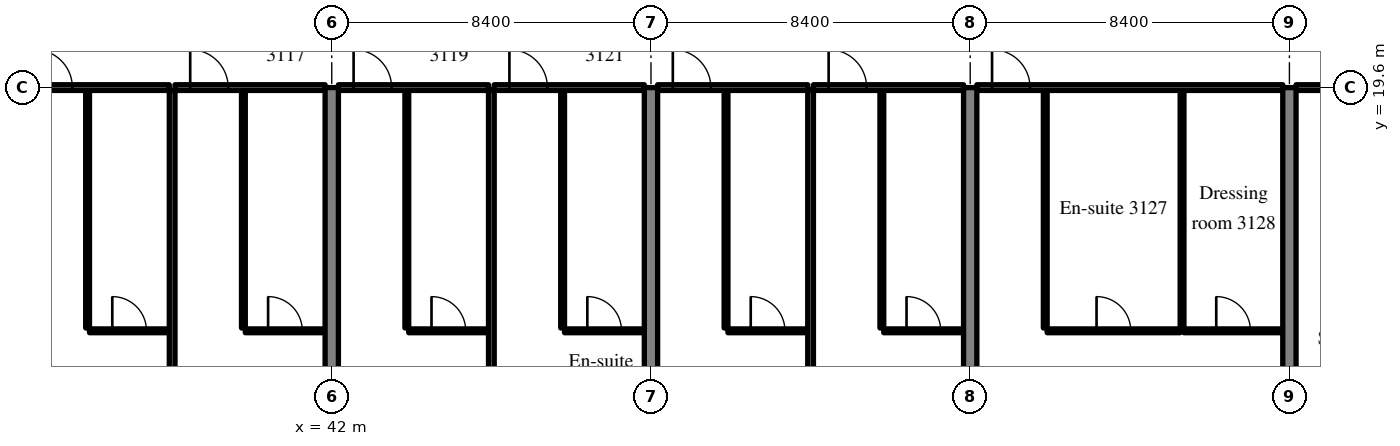
"""IFC4 building model, lengths in metres.
Left out: names, types, materials, properties, quantities, classifications, styles, units other than length and angle.
Written with IfcOpenShell. Run it as: python <this file> out.ifc"""

import sys

from ifc_helpers import new_model, si_unit, direction, frame, frame_2d, origin, place, context, subcontext, project, spatial, rectangle, extrude, source, transform, mapped, element, fill, save


model = new_model("IFC4")
c1 = context("Model", 3, precision=1e-05, world=origin(), true_north=direction((0.0, 1.0)))
c2 = subcontext(c1, "Body", "Model", "MODEL_VIEW")
j1 = project(units=[si_unit("LENGTHUNIT", "METRE"), si_unit("PLANEANGLEUNIT", "RADIAN")], contexts=[c1])
p1 = place(None, origin())
s1 = spatial("IfcSite", under=j1, at=p1, CompositionType="ELEMENT")
p2 = place(p1, origin())
s2 = spatial("IfcBuilding", under=s1, at=p2, CompositionType="ELEMENT")
p3 = place(p2, frame((0.0, 0.0, 129.4)))
s3 = spatial("IfcBuildingStorey", under=s2, at=p3, CompositionType="ELEMENT", Elevation=129.4)
m1 = source(origin(), c2, "Body", "SweptSolid", [
    extrude(rectangle(XDim=14.1, YDim=0.35, at=frame_2d((7.05, 0.0))), origin(), (0.0, 0.0, 1.0), 3.52),
])
p4 = place(p3, frame((42.0, 5.5, 0.0), z_axis=(0.0, 0.0, 1.0), x_axis=(0.0, 1.0, 0.0)))
e1 = element("IfcWall", 1, at=p4, inside=s3, PredefinedType="SHEAR", context=c2, shape_type="MappedRepresentation", body=[
    mapped(m1, transform((0.0, 0.0, 0.0), scale=1.0)),
])
m2 = source(origin(), c2, "Body", "SweptSolid", [
    extrude(rectangle(XDim=13.1, YDim=0.35, at=frame_2d((6.55, 0.0))), origin(), (0.0, 0.0, 1.0), 3.52),
])
p5 = place(p3, frame((50.4, 6.5, 0.0), z_axis=(0.0, 0.0, 1.0), x_axis=(0.0, 1.0, 0.0)))
e2 = element("IfcWall", 2, at=p5, inside=s3, PredefinedType="SHEAR", context=c2, shape_type="MappedRepresentation", body=[
    mapped(m2, transform((0.0, 0.0, 0.0), scale=1.0)),
])
for number, where, z_axis, x_axis in (
    (3, (58.8, 5.5, 0.0), (0.0, 0.0, 1.0), (0.0, 1.0, 0.0)),
    (4, (67.2, 5.5, 0.0), (0.0, 0.0, 1.0), (0.0, 1.0, 0.0)),
):
    element("IfcWall", number, at=place(p3, frame(where, z_axis=z_axis, x_axis=x_axis)), inside=s3, PredefinedType="SHEAR", context=c2, shape_type="MappedRepresentation", body=[
        mapped(m1, transform((0.0, 0.0, 0.0), scale=1.0)),
    ])
m3 = source(origin(), c2, "Body", "SweptSolid", [
    extrude(rectangle(XDim=6.25, YDim=0.1, at=frame_2d((3.125, 0.0))), origin(), (0.0, 0.0, 1.0), 3.52),
])
p6 = place(p3, frame((35.575, 13.275, 0.0), z_axis=(0.0, 0.0, 1.0), x_axis=(0.0, 1.0, 0.0)))
e5 = element("IfcWall", 5, at=p6, inside=s3, PredefinedType="PARTITIONING", context=c2, shape_type="MappedRepresentation", body=[
    mapped(m3, transform((0.0, 0.0, 0.0), scale=1.0)),
])
m4 = source(origin(), c2, "Body", "SweptSolid", [
    extrude(rectangle(XDim=2.1, YDim=0.1, at=frame_2d((1.05, 0.0))), origin(), (0.0, 0.0, 1.0), 3.52),
])
p7 = place(p3, frame((35.625, 13.2, 0.0), z_axis=(0.0, 0.0, 1.0), x_axis=(1.0, 0.0, 0.0)))
e6 = element("IfcWall", 6, at=p7, inside=s3, PredefinedType="PARTITIONING", context=c2, shape_type="MappedRepresentation", body=[
    mapped(m4, transform((0.0, 0.0, 0.0), scale=1.0)),
])
m5 = source(origin(), c2, "Body", "SweptSolid", [
    extrude(rectangle(XDim=0.9, YDim=2.1, at=frame_2d((0.45, 1.05))), frame((0.0, 0.06, 0.0), z_axis=(0.0, -1.0, 0.0), x_axis=(1.0, 0.0, 0.0)), (0.0, 0.0, 1.0), 0.12),
])
p8 = place(p7, frame((0.6, 0.0, 0.0)))
e7 = element("IfcOpeningElement", 7, at=p8, cuts=e6, PredefinedType="OPENING", context=c2, shape_type="MappedRepresentation", body=[
    mapped(m5, transform((0.0, 0.0, 0.0), scale=1.0)),
])
m6 = source(origin(), c2, "Body", "SweptSolid", [
    extrude(rectangle(XDim=3.95, YDim=0.15, at=frame_2d((1.975, 0.0))), origin(), (0.0, 0.0, 1.0), 2.82),
])
p9 = place(p3, frame((33.775, 19.6, 0.0), z_axis=(0.0, 0.0, 1.0), x_axis=(1.0, 0.0, 0.0)))
e8 = element("IfcWall", 8, at=p9, inside=s3, PredefinedType="PARTITIONING", context=c2, shape_type="MappedRepresentation", body=[
    mapped(m6, transform((0.0, 0.0, 0.0), scale=1.0)),
])
m7 = source(origin(), c2, "Body", "SweptSolid", [
    extrude(rectangle(XDim=1.0, YDim=2.1, at=frame_2d((0.5, 1.05))), frame((0.0, 0.085, 0.0), z_axis=(0.0, -1.0, 0.0), x_axis=(1.0, 0.0, 0.0)), (0.0, 0.0, 1.0), 0.17),
])
p10 = place(p9, frame((0.4, 0.0, 0.0)))
e9 = element("IfcOpeningElement", 9, at=p10, cuts=e8, PredefinedType="OPENING", context=c2, shape_type="MappedRepresentation", body=[
    mapped(m7, transform((0.0, 0.0, 0.0), scale=1.0)),
])
p11 = place(p3, frame((39.675, 13.275, 0.0), z_axis=(0.0, 0.0, 1.0), x_axis=(0.0, 1.0, 0.0)))
e10 = element("IfcWall", 10, at=p11, inside=s3, PredefinedType="PARTITIONING", context=c2, shape_type="MappedRepresentation", body=[
    mapped(m3, transform((0.0, 0.0, 0.0), scale=1.0)),
])
m8 = source(origin(), c2, "Body", "SweptSolid", [
    extrude(rectangle(XDim=2.1, YDim=0.1, at=frame_2d((1.05, 0.0))), origin(), (0.0, 0.0, 1.0), 3.52),
])
p12 = place(p3, frame((39.725, 13.2, 0.0), z_axis=(0.0, 0.0, 1.0), x_axis=(1.0, 0.0, 0.0)))
e11 = element("IfcWall", 11, at=p12, inside=s3, PredefinedType="PARTITIONING", context=c2, shape_type="MappedRepresentation", body=[
    mapped(m8, transform((0.0, 0.0, 0.0), scale=1.0)),
])
p13 = place(p12, frame((0.6, 0.0, 0.0)))
e12 = element("IfcOpeningElement", 12, at=p13, cuts=e11, PredefinedType="OPENING", context=c2, shape_type="MappedRepresentation", body=[
    mapped(m5, transform((0.0, 0.0, 0.0), scale=1.0)),
])
m9 = source(origin(), c2, "Body", "SweptSolid", [
    extrude(rectangle(XDim=3.95, YDim=0.15, at=frame_2d((1.975, 0.0))), origin(), (0.0, 0.0, 1.0), 2.82),
])
p14 = place(p3, frame((37.875, 19.6, 0.0), z_axis=(0.0, 0.0, 1.0), x_axis=(1.0, 0.0, 0.0)))
e13 = element("IfcWall", 13, at=p14, inside=s3, PredefinedType="PARTITIONING", context=c2, shape_type="MappedRepresentation", body=[
    mapped(m9, transform((0.0, 0.0, 0.0), scale=1.0)),
])
p15 = place(p14, frame((0.4, 0.0, 0.0)))
e14 = element("IfcOpeningElement", 14, at=p15, cuts=e13, PredefinedType="OPENING", context=c2, shape_type="MappedRepresentation", body=[
    mapped(m7, transform((0.0, 0.0, 0.0), scale=1.0)),
])
m10 = source(origin(), c2, "Body", "SweptSolid", [
    extrude(rectangle(XDim=15.498, YDim=0.15, at=frame_2d((7.749, 0.0))), origin(), (0.0, 0.0, 1.0), 3.52),
])
p16 = place(p3, frame((37.8, 4.027, 0.0), z_axis=(0.0, 0.0, 1.0), x_axis=(0.0, 1.0, 0.0)))
e15 = element("IfcWall", 15, at=p16, inside=s3, PredefinedType="PARTITIONING", context=c2, shape_type="MappedRepresentation", body=[
    mapped(m10, transform((0.0, 0.0, 0.0), scale=1.0)),
])
p17 = place(p3, frame((43.975, 13.275, 0.0), z_axis=(0.0, 0.0, 1.0), x_axis=(0.0, 1.0, 0.0)))
e16 = element("IfcWall", 16, at=p17, inside=s3, PredefinedType="PARTITIONING", context=c2, shape_type="MappedRepresentation", body=[
    mapped(m3, transform((0.0, 0.0, 0.0), scale=1.0)),
])
p18 = place(p3, frame((44.025, 13.2, 0.0), z_axis=(0.0, 0.0, 1.0), x_axis=(1.0, 0.0, 0.0)))
e17 = element("IfcWall", 17, at=p18, inside=s3, PredefinedType="PARTITIONING", context=c2, shape_type="MappedRepresentation", body=[
    mapped(m4, transform((0.0, 0.0, 0.0), scale=1.0)),
])
p19 = place(p18, frame((0.6, 0.0, 0.0)))
e18 = element("IfcOpeningElement", 18, at=p19, cuts=e17, PredefinedType="OPENING", context=c2, shape_type="MappedRepresentation", body=[
    mapped(m5, transform((0.0, 0.0, 0.0), scale=1.0)),
])
p20 = place(p3, frame((42.175, 19.6, 0.0), z_axis=(0.0, 0.0, 1.0), x_axis=(1.0, 0.0, 0.0)))
e19 = element("IfcWall", 19, at=p20, inside=s3, PredefinedType="PARTITIONING", context=c2, shape_type="MappedRepresentation", body=[
    mapped(m9, transform((0.0, 0.0, 0.0), scale=1.0)),
])
p21 = place(p20, frame((0.4, 0.0, 0.0)))
e20 = element("IfcOpeningElement", 20, at=p21, cuts=e19, PredefinedType="OPENING", context=c2, shape_type="MappedRepresentation", body=[
    mapped(m7, transform((0.0, 0.0, 0.0), scale=1.0)),
])
p22 = place(p3, frame((48.075, 13.275, 0.0), z_axis=(0.0, 0.0, 1.0), x_axis=(0.0, 1.0, 0.0)))
e21 = element("IfcWall", 21, at=p22, inside=s3, PredefinedType="PARTITIONING", context=c2, shape_type="MappedRepresentation", body=[
    mapped(m3, transform((0.0, 0.0, 0.0), scale=1.0)),
])
p23 = place(p3, frame((48.125, 13.2, 0.0), z_axis=(0.0, 0.0, 1.0), x_axis=(1.0, 0.0, 0.0)))
e22 = element("IfcWall", 22, at=p23, inside=s3, PredefinedType="PARTITIONING", context=c2, shape_type="MappedRepresentation", body=[
    mapped(m4, transform((0.0, 0.0, 0.0), scale=1.0)),
])
p24 = place(p23, frame((0.6, 0.0, 0.0)))
e23 = element("IfcOpeningElement", 23, at=p24, cuts=e22, PredefinedType="OPENING", context=c2, shape_type="MappedRepresentation", body=[
    mapped(m5, transform((0.0, 0.0, 0.0), scale=1.0)),
])
p25 = place(p3, frame((46.275, 19.6, 0.0), z_axis=(0.0, 0.0, 1.0), x_axis=(1.0, 0.0, 0.0)))
e24 = element("IfcWall", 24, at=p25, inside=s3, PredefinedType="PARTITIONING", context=c2, shape_type="MappedRepresentation", body=[
    mapped(m6, transform((0.0, 0.0, 0.0), scale=1.0)),
])
p26 = place(p25, frame((0.4, 0.0, 0.0)))
e25 = element("IfcOpeningElement", 25, at=p26, cuts=e24, PredefinedType="OPENING", context=c2, shape_type="MappedRepresentation", body=[
    mapped(m7, transform((0.0, 0.0, 0.0), scale=1.0)),
])
m11 = source(origin(), c2, "Body", "SweptSolid", [
    extrude(rectangle(XDim=14.906, YDim=0.15, at=frame_2d((7.453, 0.0))), origin(), (0.0, 0.0, 1.0), 3.52),
])
p27 = place(p3, frame((46.2, 4.619, 0.0), z_axis=(0.0, 0.0, 1.0), x_axis=(0.0, 1.0, 0.0)))
e26 = element("IfcWall", 26, at=p27, inside=s3, PredefinedType="PARTITIONING", context=c2, shape_type="MappedRepresentation", body=[
    mapped(m11, transform((0.0, 0.0, 0.0), scale=1.0)),
])
p28 = place(p3, frame((52.375, 13.275, 0.0), z_axis=(0.0, 0.0, 1.0), x_axis=(0.0, 1.0, 0.0)))
e27 = element("IfcWall", 27, at=p28, inside=s3, PredefinedType="PARTITIONING", context=c2, shape_type="MappedRepresentation", body=[
    mapped(m3, transform((0.0, 0.0, 0.0), scale=1.0)),
])
p29 = place(p3, frame((52.425, 13.2, 0.0), z_axis=(0.0, 0.0, 1.0), x_axis=(1.0, 0.0, 0.0)))
e28 = element("IfcWall", 28, at=p29, inside=s3, PredefinedType="PARTITIONING", context=c2, shape_type="MappedRepresentation", body=[
    mapped(m8, transform((0.0, 0.0, 0.0), scale=1.0)),
])
p30 = place(p29, frame((0.6, 0.0, 0.0)))
e29 = element("IfcOpeningElement", 29, at=p30, cuts=e28, PredefinedType="OPENING", context=c2, shape_type="MappedRepresentation", body=[
    mapped(m5, transform((0.0, 0.0, 0.0), scale=1.0)),
])
p31 = place(p3, frame((50.575, 19.6, 0.0), z_axis=(0.0, 0.0, 1.0), x_axis=(1.0, 0.0, 0.0)))
e30 = element("IfcWall", 30, at=p31, inside=s3, PredefinedType="PARTITIONING", context=c2, shape_type="MappedRepresentation", body=[
    mapped(m9, transform((0.0, 0.0, 0.0), scale=1.0)),
])
p32 = place(p31, frame((0.4, 0.0, 0.0)))
e31 = element("IfcOpeningElement", 31, at=p32, cuts=e30, PredefinedType="OPENING", context=c2, shape_type="MappedRepresentation", body=[
    mapped(m7, transform((0.0, 0.0, 0.0), scale=1.0)),
])
p33 = place(p3, frame((56.475, 13.275, 0.0), z_axis=(0.0, 0.0, 1.0), x_axis=(0.0, 1.0, 0.0)))
e32 = element("IfcWall", 32, at=p33, inside=s3, PredefinedType="PARTITIONING", context=c2, shape_type="MappedRepresentation", body=[
    mapped(m3, transform((0.0, 0.0, 0.0), scale=1.0)),
])
p34 = place(p3, frame((56.525, 13.2, 0.0), z_axis=(0.0, 0.0, 1.0), x_axis=(1.0, 0.0, 0.0)))
e33 = element("IfcWall", 33, at=p34, inside=s3, PredefinedType="PARTITIONING", context=c2, shape_type="MappedRepresentation", body=[
    mapped(m4, transform((0.0, 0.0, 0.0), scale=1.0)),
])
p35 = place(p34, frame((0.6, 0.0, 0.0)))
e34 = element("IfcOpeningElement", 34, at=p35, cuts=e33, PredefinedType="OPENING", context=c2, shape_type="MappedRepresentation", body=[
    mapped(m5, transform((0.0, 0.0, 0.0), scale=1.0)),
])
p36 = place(p3, frame((54.675, 19.6, 0.0), z_axis=(0.0, 0.0, 1.0), x_axis=(1.0, 0.0, 0.0)))
e35 = element("IfcWall", 35, at=p36, inside=s3, PredefinedType="PARTITIONING", context=c2, shape_type="MappedRepresentation", body=[
    mapped(m9, transform((0.0, 0.0, 0.0), scale=1.0)),
])
p37 = place(p36, frame((0.4, 0.0, 0.0)))
e36 = element("IfcOpeningElement", 36, at=p37, cuts=e35, PredefinedType="OPENING", context=c2, shape_type="MappedRepresentation", body=[
    mapped(m7, transform((0.0, 0.0, 0.0), scale=1.0)),
])
p38 = place(p3, frame((54.6, 4.619, 0.0), z_axis=(0.0, 0.0, 1.0), x_axis=(0.0, 1.0, 0.0)))
e37 = element("IfcWall", 37, at=p38, inside=s3, PredefinedType="PARTITIONING", context=c2, shape_type="MappedRepresentation", body=[
    mapped(m11, transform((0.0, 0.0, 0.0), scale=1.0)),
])
for number, where, z_axis, x_axis in (
    (38, (60.775, 13.275, 0.0), (0.0, 0.0, 1.0), (0.0, 1.0, 0.0)),
    (39, (64.375, 13.275, 0.0), (0.0, 0.0, 1.0), (0.0, 1.0, 0.0)),
):
    element("IfcWall", number, at=place(p3, frame(where, z_axis=z_axis, x_axis=x_axis)), inside=s3, PredefinedType="PARTITIONING", context=c2, shape_type="MappedRepresentation", body=[
        mapped(m3, transform((0.0, 0.0, 0.0), scale=1.0)),
    ])
m12 = source(origin(), c2, "Body", "SweptSolid", [
    extrude(rectangle(XDim=3.5, YDim=0.1, at=frame_2d((1.75, 0.0))), origin(), (0.0, 0.0, 1.0), 3.52),
])
p39 = place(p3, frame((60.825, 13.2, 0.0), z_axis=(0.0, 0.0, 1.0), x_axis=(1.0, 0.0, 0.0)))
e40 = element("IfcWall", 40, at=p39, inside=s3, PredefinedType="PARTITIONING", context=c2, shape_type="MappedRepresentation", body=[
    mapped(m12, transform((0.0, 0.0, 0.0), scale=1.0)),
])
p40 = place(p39, frame((1.3, 0.0, 0.0)))
e41 = element("IfcOpeningElement", 41, at=p40, cuts=e40, PredefinedType="OPENING", context=c2, shape_type="MappedRepresentation", body=[
    mapped(m5, transform((0.0, 0.0, 0.0), scale=1.0)),
])
m13 = source(origin(), c2, "Body", "SweptSolid", [
    extrude(rectangle(XDim=2.6, YDim=0.1, at=frame_2d((1.3, 0.0))), origin(), (0.0, 0.0, 1.0), 3.52),
])
p41 = place(p3, frame((64.425, 13.2, 0.0), z_axis=(0.0, 0.0, 1.0), x_axis=(1.0, 0.0, 0.0)))
e42 = element("IfcWall", 42, at=p41, inside=s3, PredefinedType="PARTITIONING", context=c2, shape_type="MappedRepresentation", body=[
    mapped(m13, transform((0.0, 0.0, 0.0), scale=1.0)),
])
p42 = place(p41, frame((0.85, 0.0, 0.0)))
e43 = element("IfcOpeningElement", 43, at=p42, cuts=e42, PredefinedType="OPENING", context=c2, shape_type="MappedRepresentation", body=[
    mapped(m5, transform((0.0, 0.0, 0.0), scale=1.0)),
])
m14 = source(origin(), c2, "Body", "SweptSolid", [
    extrude(rectangle(XDim=8.05, YDim=0.15, at=frame_2d((4.025, 0.0))), origin(), (0.0, 0.0, 1.0), 2.82),
])
p43 = place(p3, frame((58.975, 19.6, 0.0), z_axis=(0.0, 0.0, 1.0), x_axis=(1.0, 0.0, 0.0)))
e44 = element("IfcWall", 44, at=p43, inside=s3, PredefinedType="PARTITIONING", context=c2, shape_type="MappedRepresentation", body=[
    mapped(m14, transform((0.0, 0.0, 0.0), scale=1.0)),
])
p44 = place(p43, frame((0.4, 0.0, 0.0)))
e45 = element("IfcOpeningElement", 45, at=p44, cuts=e44, PredefinedType="OPENING", context=c2, shape_type="MappedRepresentation", body=[
    mapped(m7, transform((0.0, 0.0, 0.0), scale=1.0)),
])
p45 = place(p3, frame((67.375, 19.6, 0.0), z_axis=(0.0, 0.0, 1.0), x_axis=(1.0, 0.0, 0.0)))
e46 = element("IfcWall", 46, at=p45, inside=s3, PredefinedType="PARTITIONING", context=c2, shape_type="MappedRepresentation", body=[
    mapped(m9, transform((0.0, 0.0, 0.0), scale=1.0)),
])
p46 = place(p45, frame((1.475, 0.0, 0.0)))
e47 = element("IfcOpeningElement", 47, at=p46, cuts=e46, PredefinedType="OPENING", context=c2, shape_type="MappedRepresentation", body=[
    mapped(m7, transform((0.0, 0.0, 0.0), scale=1.0)),
])
m15 = source(origin(), c2, "Body", "SweptSolid", [
    extrude(rectangle(XDim=0.9, YDim=2.1, at=frame_2d((0.45, 1.05))), frame((0.0, 0.025, 0.0), z_axis=(0.0, -1.0, 0.0), x_axis=(1.0, 0.0, 0.0)), (0.0, 0.0, 1.0), 0.05),
])
p47 = place(p8, origin())
e48 = element("IfcDoor", 48, at=p47, inside=s3, OperationType="SINGLE_SWING_LEFT", PredefinedType="DOOR", context=c2, shape_type="MappedRepresentation", body=[
    mapped(m15, transform((0.0, 0.0, 0.0), scale=1.0)),
])
fill(e7, e48)
m16 = source(origin(), c2, "Body", "SweptSolid", [
    extrude(rectangle(XDim=1.0, YDim=2.1, at=frame_2d((0.5, 1.05))), frame((0.0, 0.025, 0.0), z_axis=(0.0, -1.0, 0.0), x_axis=(1.0, 0.0, 0.0)), (0.0, 0.0, 1.0), 0.05),
])
p48 = place(p10, origin())
e49 = element("IfcDoor", 49, at=p48, inside=s3, OperationType="SINGLE_SWING_LEFT", PredefinedType="DOOR", context=c2, shape_type="MappedRepresentation", body=[
    mapped(m16, transform((0.0, 0.0, 0.0), scale=1.0)),
])
fill(e9, e49)
p49 = place(p13, origin())
e50 = element("IfcDoor", 50, at=p49, inside=s3, OperationType="SINGLE_SWING_LEFT", PredefinedType="DOOR", context=c2, shape_type="MappedRepresentation", body=[
    mapped(m15, transform((0.0, 0.0, 0.0), scale=1.0)),
])
fill(e12, e50)
p50 = place(p15, origin())
e51 = element("IfcDoor", 51, at=p50, inside=s3, OperationType="SINGLE_SWING_LEFT", PredefinedType="DOOR", context=c2, shape_type="MappedRepresentation", body=[
    mapped(m16, transform((0.0, 0.0, 0.0), scale=1.0)),
])
fill(e14, e51)
p51 = place(p19, origin())
e52 = element("IfcDoor", 52, at=p51, inside=s3, OperationType="SINGLE_SWING_LEFT", PredefinedType="DOOR", context=c2, shape_type="MappedRepresentation", body=[
    mapped(m15, transform((0.0, 0.0, 0.0), scale=1.0)),
])
fill(e18, e52)
p52 = place(p21, origin())
e53 = element("IfcDoor", 53, at=p52, inside=s3, OperationType="SINGLE_SWING_LEFT", PredefinedType="DOOR", context=c2, shape_type="MappedRepresentation", body=[
    mapped(m16, transform((0.0, 0.0, 0.0), scale=1.0)),
])
fill(e20, e53)
p53 = place(p24, origin())
e54 = element("IfcDoor", 54, at=p53, inside=s3, OperationType="SINGLE_SWING_LEFT", PredefinedType="DOOR", context=c2, shape_type="MappedRepresentation", body=[
    mapped(m15, transform((0.0, 0.0, 0.0), scale=1.0)),
])
fill(e23, e54)
p54 = place(p26, origin())
e55 = element("IfcDoor", 55, at=p54, inside=s3, OperationType="SINGLE_SWING_LEFT", PredefinedType="DOOR", context=c2, shape_type="MappedRepresentation", body=[
    mapped(m16, transform((0.0, 0.0, 0.0), scale=1.0)),
])
fill(e25, e55)
p55 = place(p30, origin())
e56 = element("IfcDoor", 56, at=p55, inside=s3, OperationType="SINGLE_SWING_LEFT", PredefinedType="DOOR", context=c2, shape_type="MappedRepresentation", body=[
    mapped(m15, transform((0.0, 0.0, 0.0), scale=1.0)),
])
fill(e29, e56)
p56 = place(p32, origin())
e57 = element("IfcDoor", 57, at=p56, inside=s3, OperationType="SINGLE_SWING_LEFT", PredefinedType="DOOR", context=c2, shape_type="MappedRepresentation", body=[
    mapped(m16, transform((0.0, 0.0, 0.0), scale=1.0)),
])
fill(e31, e57)
p57 = place(p35, origin())
e58 = element("IfcDoor", 58, at=p57, inside=s3, OperationType="SINGLE_SWING_LEFT", PredefinedType="DOOR", context=c2, shape_type="MappedRepresentation", body=[
    mapped(m15, transform((0.0, 0.0, 0.0), scale=1.0)),
])
fill(e34, e58)
p58 = place(p37, origin())
e59 = element("IfcDoor", 59, at=p58, inside=s3, OperationType="SINGLE_SWING_LEFT", PredefinedType="DOOR", context=c2, shape_type="MappedRepresentation", body=[
    mapped(m16, transform((0.0, 0.0, 0.0), scale=1.0)),
])
fill(e36, e59)
p59 = place(p40, origin())
e60 = element("IfcDoor", 60, at=p59, inside=s3, OperationType="SINGLE_SWING_LEFT", PredefinedType="DOOR", context=c2, shape_type="MappedRepresentation", body=[
    mapped(m15, transform((0.0, 0.0, 0.0), scale=1.0)),
])
fill(e41, e60)
p60 = place(p42, origin())
e61 = element("IfcDoor", 61, at=p60, inside=s3, OperationType="SINGLE_SWING_LEFT", PredefinedType="DOOR", context=c2, shape_type="MappedRepresentation", body=[
    mapped(m15, transform((0.0, 0.0, 0.0), scale=1.0)),
])
fill(e43, e61)
p61 = place(p44, origin())
e62 = element("IfcDoor", 62, at=p61, inside=s3, OperationType="SINGLE_SWING_LEFT", PredefinedType="DOOR", context=c2, shape_type="MappedRepresentation", body=[
    mapped(m16, transform((0.0, 0.0, 0.0), scale=1.0)),
])
fill(e45, e62)
save(model, sys.argv[1])
